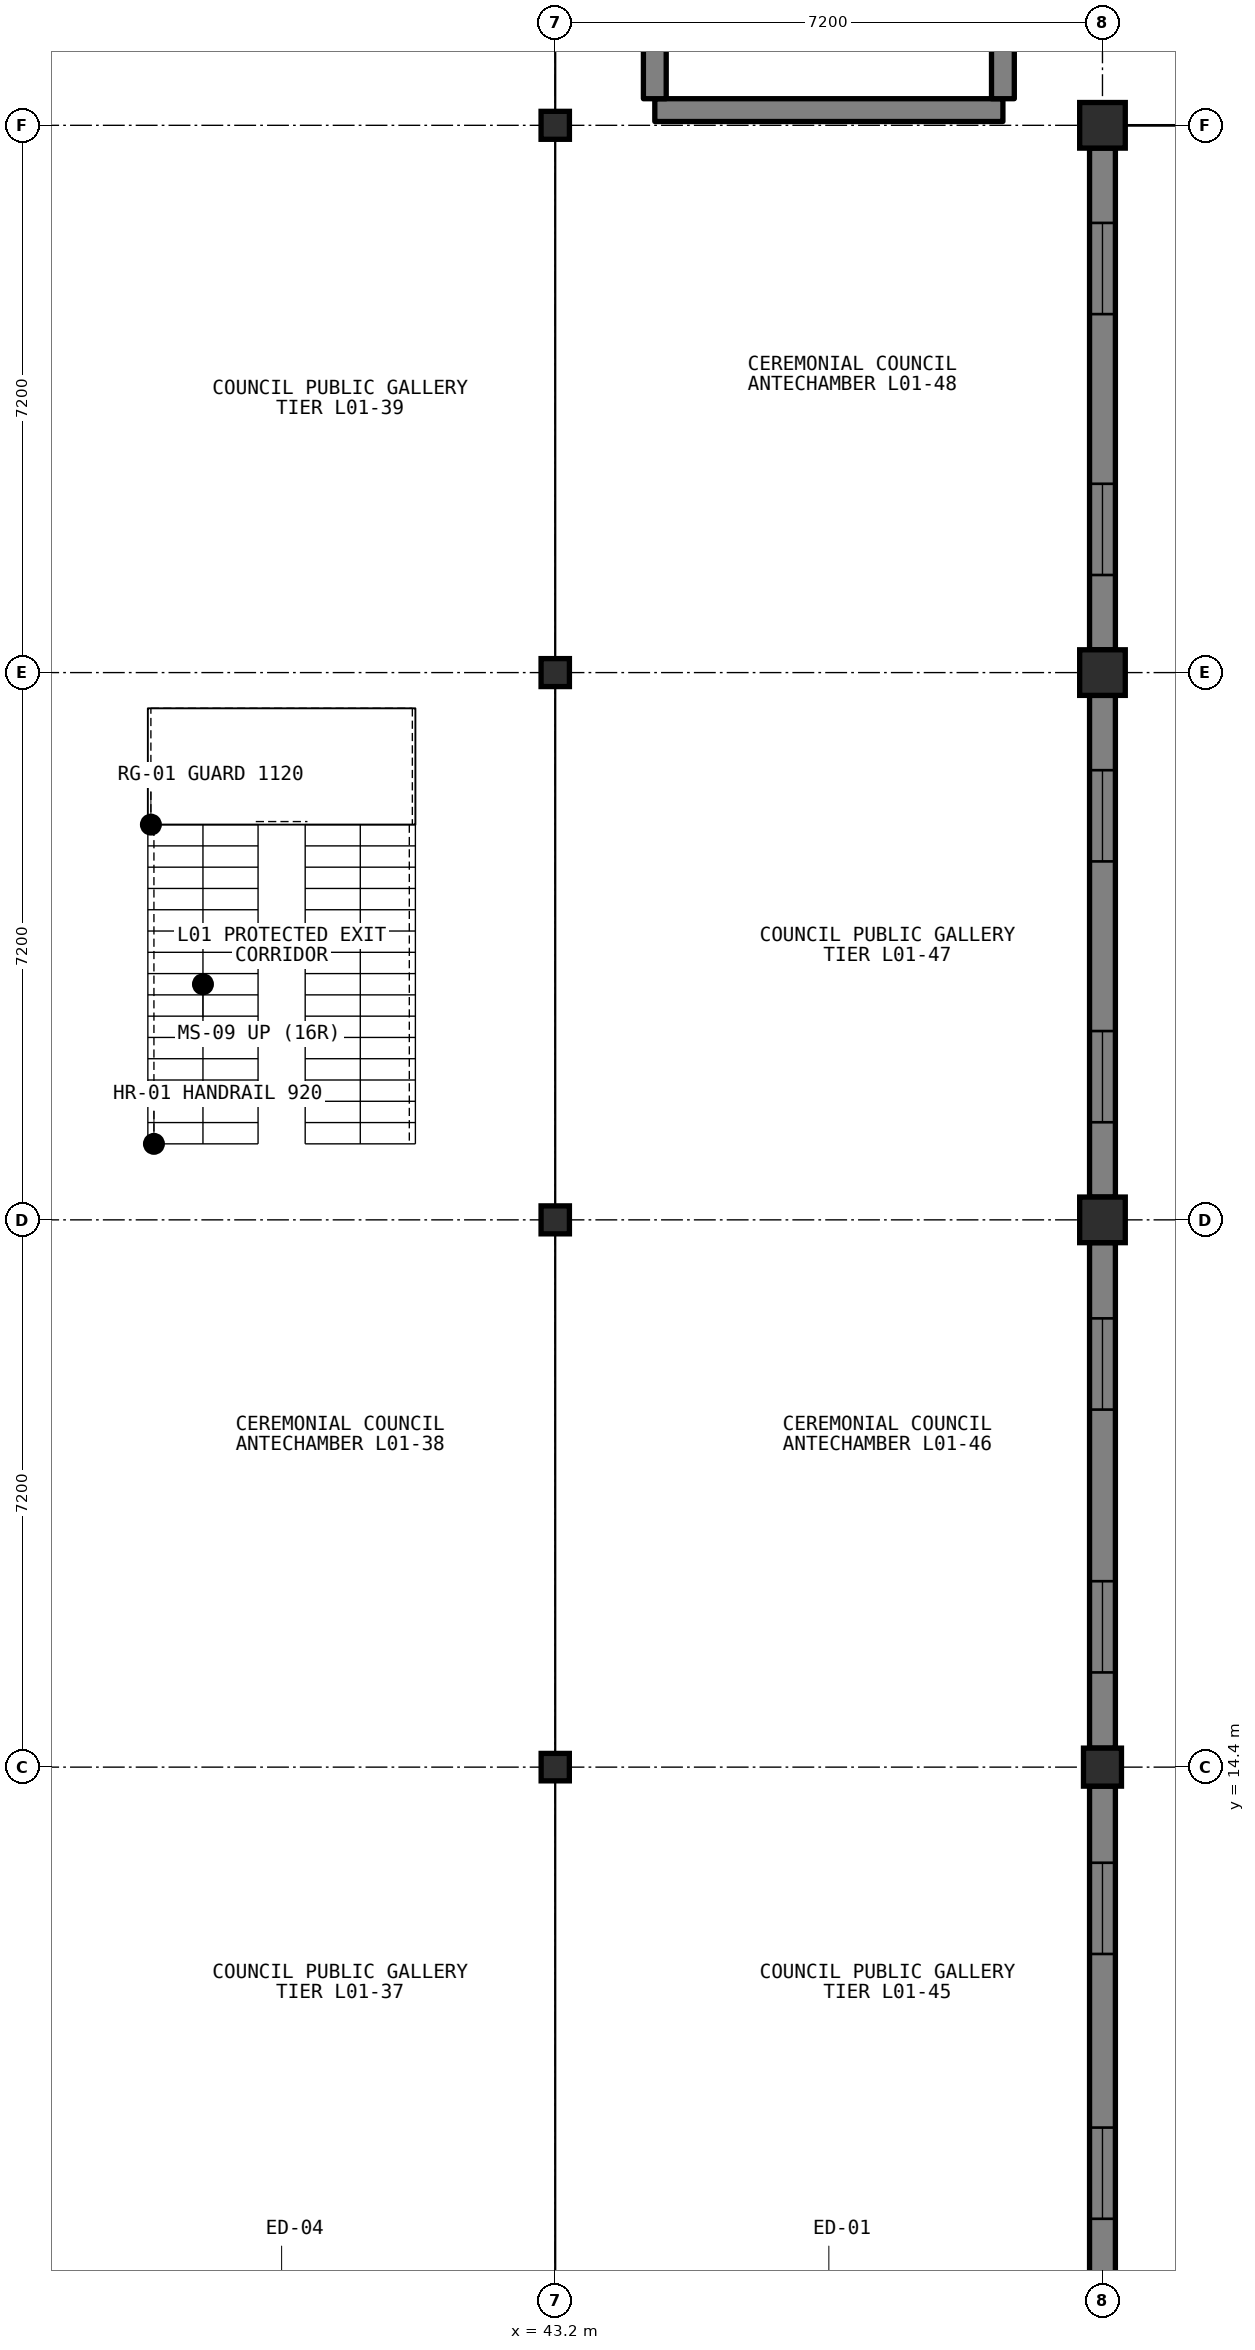
"""IFC4 building model, lengths in metres.
Left out: names, types, materials, properties, quantities, classifications, styles, units other than length and angle.
Written with IfcOpenShell. Run it as: python <this file> out.ifc"""

import sys

from ifc_helpers import new_model, si_unit, direction, frame, frame_2d, origin, origin_2d, place, context, subcontext, project, spatial, rectangle, i_section, extrude, element, fill, save


model = new_model("IFC4")
c1 = context("Model", 3, precision=1e-05, world=origin(), true_north=direction((0.0, 1.0)))
c2 = subcontext(c1, "Body", "Model", "MODEL_VIEW")
j1 = project(units=[si_unit("LENGTHUNIT", "METRE"), si_unit("PLANEANGLEUNIT", "RADIAN")], contexts=[c1])
p1 = place(None, origin())
s1 = spatial("IfcSite", under=j1, at=p1, CompositionType="ELEMENT")
p2 = place(p1, origin())
s2 = spatial("IfcBuilding", under=s1, at=p2, CompositionType="ELEMENT")
p3 = place(p2, origin())
s3 = spatial("IfcBuildingStorey", under=s2, at=p3, CompositionType="ELEMENT", Elevation=0.0)
p4 = place(p3, frame((43.2, 14.4, 0.0), z_axis=(0.0, 0.0, 1.0), x_axis=(1.0, 0.0, 0.0)))
e1 = element("IfcColumn", 1, at=p4, inside=s3, PredefinedType="COLUMN", context=c2, shape_type="SweptSolid", body=[
    extrude(i_section(OverallWidth=0.371, OverallDepth=0.361, WebThickness=0.012, FlangeThickness=0.02, FilletRadius=0.015, at=origin_2d()), origin(), (0.0, 0.0, 1.0), 5.4),
])
for number, where, z_axis, x_axis in (
    (2, (43.2, 21.6, 0.0), (0.0, 0.0, 1.0), (1.0, 0.0, 0.0)),
    (3, (43.2, 28.8, 0.0), (0.0, 0.0, 1.0), (1.0, 0.0, 0.0)),
    (4, (43.2, 36.0, 0.0), (0.0, 0.0, 1.0), (1.0, 0.0, 0.0)),
):
    element("IfcColumn", number, at=place(p3, frame(where, z_axis=z_axis, x_axis=x_axis)), inside=s3, PredefinedType="COLUMN", context=c2, shape_type="SweptSolid", body=[
        extrude(i_section(OverallWidth=0.373, OverallDepth=0.368, WebThickness=0.015, FlangeThickness=0.024, FilletRadius=0.015, at=origin_2d()), origin(), (0.0, 0.0, 1.0), 5.4),
    ])
p5 = place(p3, frame((50.4, 14.4, 0.0), z_axis=(0.0, 0.0, 1.0), x_axis=(1.0, 0.0, 0.0)))
e5 = element("IfcColumn", 5, at=p5, inside=s3, PredefinedType="COLUMN", context=c2, shape_type="SweptSolid", body=[
    extrude(rectangle(XDim=0.5, YDim=0.5, at=origin_2d()), origin(), (0.0, 0.0, 1.0), 5.4),
])
for number, where, z_axis, x_axis in (
    (6, (50.4, 21.6, 0.0), (0.0, 0.0, 1.0), (1.0, 0.0, 0.0)),
    (7, (50.4, 28.8, 0.0), (0.0, 0.0, 1.0), (1.0, 0.0, 0.0)),
    (8, (50.4, 36.0, 0.0), (0.0, 0.0, 1.0), (1.0, 0.0, 0.0)),
):
    element("IfcColumn", number, at=place(p3, frame(where, z_axis=z_axis, x_axis=x_axis)), inside=s3, PredefinedType="COLUMN", context=c2, shape_type="SweptSolid", body=[
        extrude(rectangle(XDim=0.6, YDim=0.6, at=origin_2d()), origin(), (0.0, 0.0, 1.0), 5.4),
    ])
p6 = place(p3, frame((50.4, 14.15, 0.0), z_axis=(0.0, 0.0, 1.0), x_axis=(0.0, -1.0, 0.0)))
e9 = element("IfcWall", 9, at=p6, inside=s3, PredefinedType="SOLIDWALL", context=c2, shape_type="SweptSolid", body=[
    extrude(rectangle(XDim=6.7, YDim=0.34, at=frame_2d((3.35, 0.0))), origin(), (0.0, 0.0, 1.0), 4.667),
])
p7 = place(p6, frame((1.008, 0.0, 0.95)))
e10 = element("IfcOpeningElement", 10, at=p7, cuts=e9, PredefinedType="OPENING", context=c2, shape_type="SweptSolid", body=[
    extrude(rectangle(XDim=1.2, YDim=1.7, at=frame_2d((0.6, 0.85))), frame((0.0, 0.18, 0.0), z_axis=(0.0, -1.0, 0.0), x_axis=(1.0, 0.0, 0.0)), (0.0, 0.0, 1.0), 0.36),
])
p8 = place(p6, frame((4.492, 0.0, 0.95)))
e11 = element("IfcOpeningElement", 11, at=p8, cuts=e9, PredefinedType="OPENING", context=c2, shape_type="SweptSolid", body=[
    extrude(rectangle(XDim=1.2, YDim=1.7, at=frame_2d((0.6, 0.85))), frame((0.0, 0.18, 0.0), z_axis=(0.0, -1.0, 0.0), x_axis=(1.0, 0.0, 0.0)), (0.0, 0.0, 1.0), 0.36),
])
p9 = place(p3, frame((50.4, 21.3, 0.0), z_axis=(0.0, 0.0, 1.0), x_axis=(0.0, -1.0, 0.0)))
e12 = element("IfcWall", 12, at=p9, inside=s3, PredefinedType="SOLIDWALL", context=c2, shape_type="SweptSolid", body=[
    extrude(rectangle(XDim=6.65, YDim=0.34, at=frame_2d((3.325, 0.0))), origin(), (0.0, 0.0, 1.0), 4.667),
])
p10 = place(p9, frame((0.996, 0.0, 0.95)))
e13 = element("IfcOpeningElement", 13, at=p10, cuts=e12, PredefinedType="OPENING", context=c2, shape_type="SweptSolid", body=[
    extrude(rectangle(XDim=1.2, YDim=1.7, at=frame_2d((0.6, 0.85))), frame((0.0, 0.18, 0.0), z_axis=(0.0, -1.0, 0.0), x_axis=(1.0, 0.0, 0.0)), (0.0, 0.0, 1.0), 0.36),
])
p11 = place(p9, frame((4.454, 0.0, 0.95)))
e14 = element("IfcOpeningElement", 14, at=p11, cuts=e12, PredefinedType="OPENING", context=c2, shape_type="SweptSolid", body=[
    extrude(rectangle(XDim=1.2, YDim=1.7, at=frame_2d((0.6, 0.85))), frame((0.0, 0.18, 0.0), z_axis=(0.0, -1.0, 0.0), x_axis=(1.0, 0.0, 0.0)), (0.0, 0.0, 1.0), 0.36),
])
p12 = place(p3, frame((50.4, 28.5, 0.0), z_axis=(0.0, 0.0, 1.0), x_axis=(0.0, -1.0, 0.0)))
e15 = element("IfcWall", 15, at=p12, inside=s3, PredefinedType="SOLIDWALL", context=c2, shape_type="SweptSolid", body=[
    extrude(rectangle(XDim=6.6, YDim=0.34, at=frame_2d((3.3, 0.0))), origin(), (0.0, 0.0, 1.0), 4.667),
])
p13 = place(p12, frame((0.984, 0.0, 0.95)))
e16 = element("IfcOpeningElement", 16, at=p13, cuts=e15, PredefinedType="OPENING", context=c2, shape_type="SweptSolid", body=[
    extrude(rectangle(XDim=1.2, YDim=1.7, at=frame_2d((0.6, 0.85))), frame((0.0, 0.18, 0.0), z_axis=(0.0, -1.0, 0.0), x_axis=(1.0, 0.0, 0.0)), (0.0, 0.0, 1.0), 0.36),
])
p14 = place(p12, frame((4.416, 0.0, 0.95)))
e17 = element("IfcOpeningElement", 17, at=p14, cuts=e15, PredefinedType="OPENING", context=c2, shape_type="SweptSolid", body=[
    extrude(rectangle(XDim=1.2, YDim=1.7, at=frame_2d((0.6, 0.85))), frame((0.0, 0.18, 0.0), z_axis=(0.0, -1.0, 0.0), x_axis=(1.0, 0.0, 0.0)), (0.0, 0.0, 1.0), 0.36),
])
p15 = place(p3, frame((50.4, 35.7, 0.0), z_axis=(0.0, 0.0, 1.0), x_axis=(0.0, -1.0, 0.0)))
e18 = element("IfcWall", 18, at=p15, inside=s3, PredefinedType="SOLIDWALL", context=c2, shape_type="SweptSolid", body=[
    extrude(rectangle(XDim=6.6, YDim=0.34, at=frame_2d((3.3, 0.0))), origin(), (0.0, 0.0, 1.0), 4.667),
])
p16 = place(p15, frame((0.984, 0.0, 0.95)))
e19 = element("IfcOpeningElement", 19, at=p16, cuts=e18, PredefinedType="OPENING", context=c2, shape_type="SweptSolid", body=[
    extrude(rectangle(XDim=1.2, YDim=1.7, at=frame_2d((0.6, 0.85))), frame((0.0, 0.18, 0.0), z_axis=(0.0, -1.0, 0.0), x_axis=(1.0, 0.0, 0.0)), (0.0, 0.0, 1.0), 0.36),
])
p17 = place(p15, frame((4.416, 0.0, 0.95)))
e20 = element("IfcOpeningElement", 20, at=p17, cuts=e18, PredefinedType="OPENING", context=c2, shape_type="SweptSolid", body=[
    extrude(rectangle(XDim=1.2, YDim=1.7, at=frame_2d((0.6, 0.85))), frame((0.0, 0.18, 0.0), z_axis=(0.0, -1.0, 0.0), x_axis=(1.0, 0.0, 0.0)), (0.0, 0.0, 1.0), 0.36),
])
p18 = place(p3, frame((44.51, 36.2, 0.0), z_axis=(0.0, 0.0, 1.0), x_axis=(1.0, 0.0, 0.0)))
e21 = element("IfcWall", 21, at=p18, inside=s3, PredefinedType="SHEAR", context=c2, shape_type="SweptSolid", body=[
    extrude(rectangle(XDim=4.58, YDim=0.3, at=frame_2d((2.29, 0.0))), origin(), (0.0, 0.0, 1.0), 5.2),
])
for number, where, z_axis, x_axis in (
    (22, (44.51, 36.35, 0.0), (0.0, 0.0, 1.0), (0.0, 1.0, 0.0)),
    (23, (49.09, 36.35, 0.0), (0.0, 0.0, 1.0), (0.0, 1.0, 0.0)),
):
    element("IfcWall", number, at=place(p3, frame(where, z_axis=z_axis, x_axis=x_axis)), inside=s3, PredefinedType="SHEAR", context=c2, shape_type="SweptSolid", body=[
        extrude(rectangle(XDim=9.3, YDim=0.3, at=frame_2d((4.65, 0.0))), origin(), (0.0, 0.0, 1.0), 5.2),
    ])
p19 = place(p7, origin())
e24 = element("IfcWindow", 24, at=p19, inside=s3, PartitioningType="SINGLE_PANEL", PredefinedType="WINDOW", context=c2, shape_type="SweptSolid", body=[
    extrude(rectangle(XDim=1.2, YDim=1.7, at=frame_2d((0.6, 0.85))), frame((0.0, 0.03, 0.0), z_axis=(0.0, -1.0, 0.0), x_axis=(1.0, 0.0, 0.0)), (0.0, 0.0, 1.0), 0.06),
])
fill(e10, e24)
p20 = place(p8, origin())
e25 = element("IfcWindow", 25, at=p20, inside=s3, PartitioningType="SINGLE_PANEL", PredefinedType="WINDOW", context=c2, shape_type="SweptSolid", body=[
    extrude(rectangle(XDim=1.2, YDim=1.7, at=frame_2d((0.6, 0.85))), frame((0.0, 0.03, 0.0), z_axis=(0.0, -1.0, 0.0), x_axis=(1.0, 0.0, 0.0)), (0.0, 0.0, 1.0), 0.06),
])
fill(e11, e25)
p21 = place(p10, origin())
e26 = element("IfcWindow", 26, at=p21, inside=s3, PartitioningType="SINGLE_PANEL", PredefinedType="WINDOW", context=c2, shape_type="SweptSolid", body=[
    extrude(rectangle(XDim=1.2, YDim=1.7, at=frame_2d((0.6, 0.85))), frame((0.0, 0.03, 0.0), z_axis=(0.0, -1.0, 0.0), x_axis=(1.0, 0.0, 0.0)), (0.0, 0.0, 1.0), 0.06),
])
fill(e13, e26)
p22 = place(p11, origin())
e27 = element("IfcWindow", 27, at=p22, inside=s3, PartitioningType="SINGLE_PANEL", PredefinedType="WINDOW", context=c2, shape_type="SweptSolid", body=[
    extrude(rectangle(XDim=1.2, YDim=1.7, at=frame_2d((0.6, 0.85))), frame((0.0, 0.03, 0.0), z_axis=(0.0, -1.0, 0.0), x_axis=(1.0, 0.0, 0.0)), (0.0, 0.0, 1.0), 0.06),
])
fill(e14, e27)
p23 = place(p13, origin())
e28 = element("IfcWindow", 28, at=p23, inside=s3, PartitioningType="SINGLE_PANEL", PredefinedType="WINDOW", context=c2, shape_type="SweptSolid", body=[
    extrude(rectangle(XDim=1.2, YDim=1.7, at=frame_2d((0.6, 0.85))), frame((0.0, 0.03, 0.0), z_axis=(0.0, -1.0, 0.0), x_axis=(1.0, 0.0, 0.0)), (0.0, 0.0, 1.0), 0.06),
])
fill(e16, e28)
p24 = place(p14, origin())
e29 = element("IfcWindow", 29, at=p24, inside=s3, PartitioningType="SINGLE_PANEL", PredefinedType="WINDOW", context=c2, shape_type="SweptSolid", body=[
    extrude(rectangle(XDim=1.2, YDim=1.7, at=frame_2d((0.6, 0.85))), frame((0.0, 0.03, 0.0), z_axis=(0.0, -1.0, 0.0), x_axis=(1.0, 0.0, 0.0)), (0.0, 0.0, 1.0), 0.06),
])
fill(e17, e29)
p25 = place(p16, origin())
e30 = element("IfcWindow", 30, at=p25, inside=s3, PartitioningType="SINGLE_PANEL", PredefinedType="WINDOW", context=c2, shape_type="SweptSolid", body=[
    extrude(rectangle(XDim=1.2, YDim=1.7, at=frame_2d((0.6, 0.85))), frame((0.0, 0.03, 0.0), z_axis=(0.0, -1.0, 0.0), x_axis=(1.0, 0.0, 0.0)), (0.0, 0.0, 1.0), 0.06),
])
fill(e19, e30)
p26 = place(p17, origin())
e31 = element("IfcWindow", 31, at=p26, inside=s3, PartitioningType="SINGLE_PANEL", PredefinedType="WINDOW", context=c2, shape_type="SweptSolid", body=[
    extrude(rectangle(XDim=1.2, YDim=1.7, at=frame_2d((0.6, 0.85))), frame((0.0, 0.03, 0.0), z_axis=(0.0, -1.0, 0.0), x_axis=(1.0, 0.0, 0.0)), (0.0, 0.0, 1.0), 0.06),
])
fill(e20, e31)
save(model, sys.argv[1])
